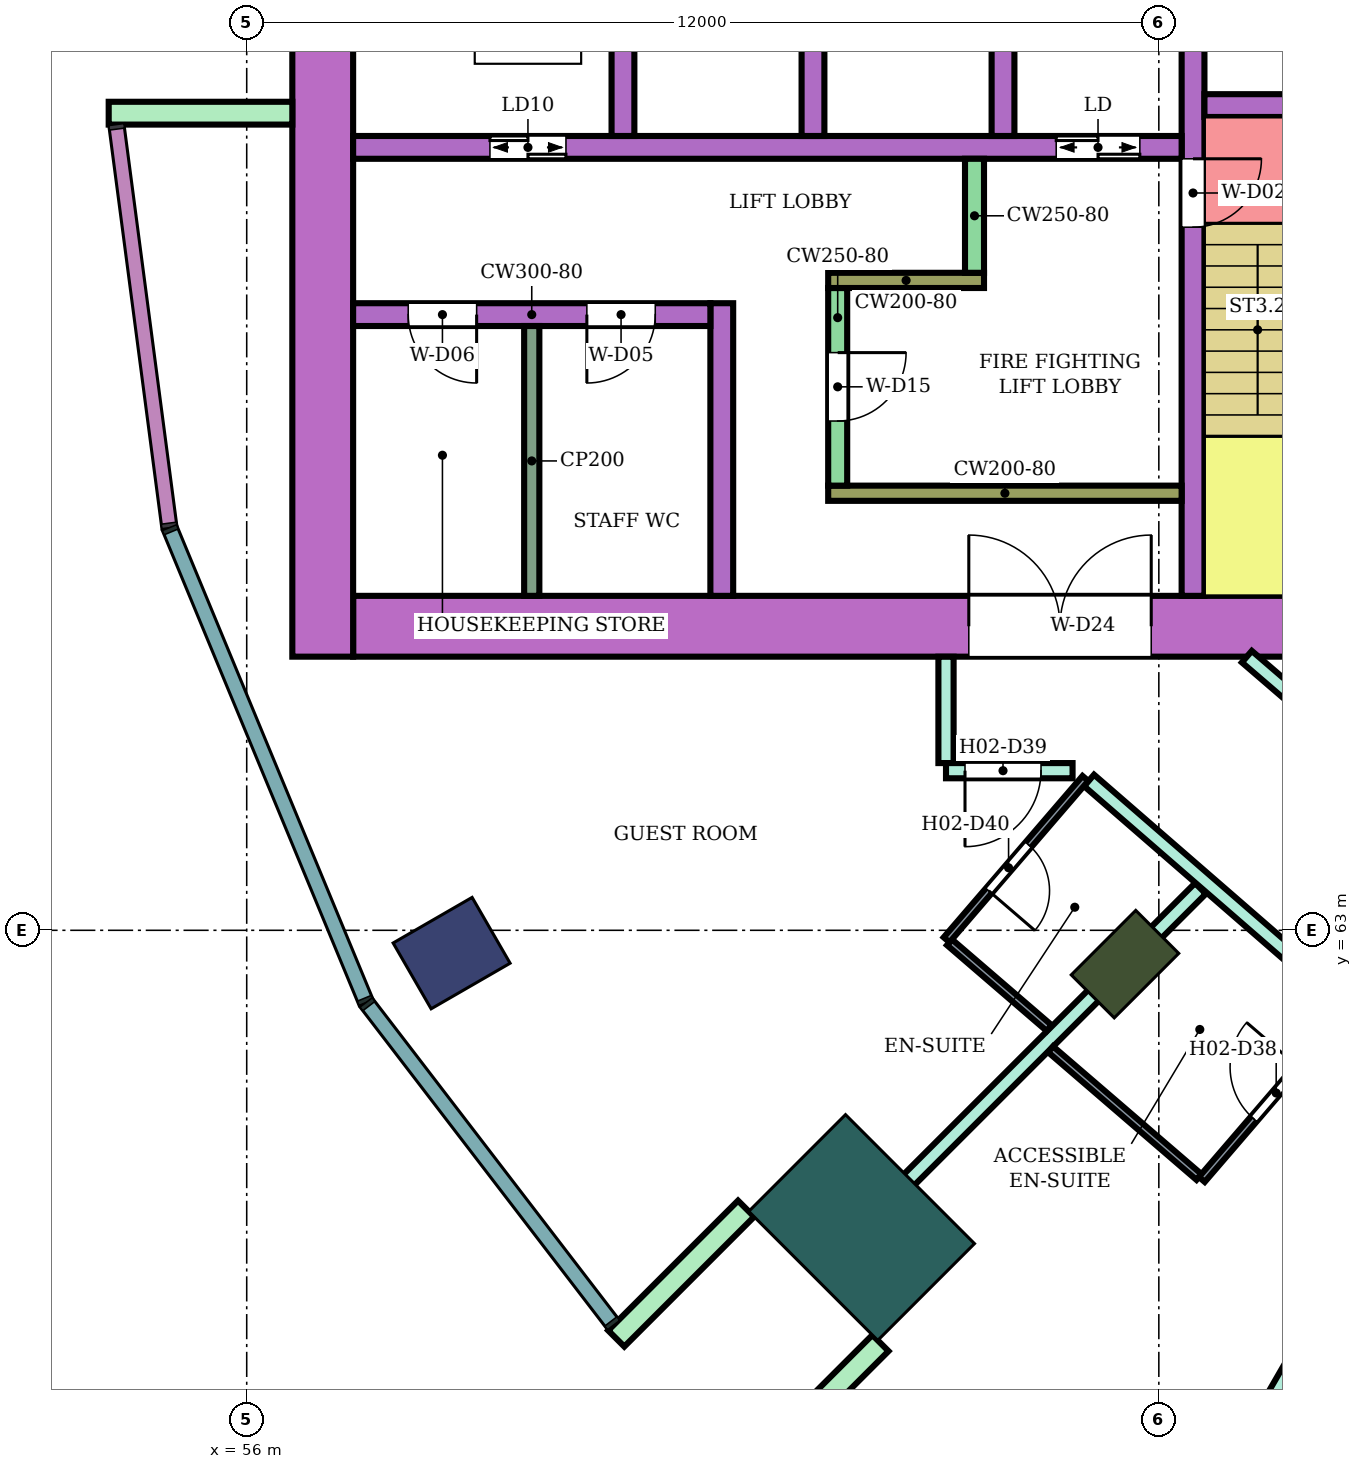
"""IFC4 building model, lengths in metres.
Left out: names, types, materials, properties, quantities, classifications, styles, units other than length and angle.
Written with IfcOpenShell. Run it as: python <this file> out.ifc"""

import sys

from ifc_helpers import new_model, si_unit, direction, frame, frame_2d, origin, origin_2d, place, context, subcontext, project, spatial, rectangle, extrude, element, fill, save


model = new_model("IFC4")
c1 = context("Model", 3, precision=1e-05, world=origin(), true_north=direction((0.0, 1.0)))
c2 = subcontext(c1, "Body", "Model", "MODEL_VIEW")
j1 = project(units=[si_unit("LENGTHUNIT", "METRE"), si_unit("PLANEANGLEUNIT", "RADIAN")], contexts=[c1])
p1 = place(None, origin())
s1 = spatial("IfcSite", under=j1, at=p1, CompositionType="ELEMENT")
p2 = place(p1, origin())
s2 = spatial("IfcBuilding", under=s1, at=p2, CompositionType="ELEMENT")
p3 = place(p2, frame((0.0, 0.0, 40.2)))
s3 = spatial("IfcBuildingStorey", under=s2, at=p3, CompositionType="ELEMENT", Elevation=40.2)
p4 = place(p3, frame((58.696, 62.7, 0.0), z_axis=(0.0, 0.0, 1.0), x_axis=(-0.866025403784, -0.5, 0.0)))
e1 = element("IfcColumn", 1, at=p4, inside=s3, PredefinedType="COLUMN", context=c2, shape_type="SweptSolid", body=[
    extrude(rectangle(XDim=1.2, YDim=1.0, at=origin_2d()), origin(), (0.0, 0.0, 1.0), 3.8),
])
p5 = place(p3, frame((67.555, 62.555, 0.0), z_axis=(0.0, 0.0, 1.0), x_axis=(-0.707106781187, -0.707106781187, 0.0)))
e2 = element("IfcColumn", 2, at=p5, inside=s3, PredefinedType="COLUMN", context=c2, shape_type="SweptSolid", body=[
    extrude(rectangle(XDim=1.2, YDim=0.8, at=origin_2d()), origin(), (0.0, 0.0, 1.0), 3.8),
])
p6 = place(p3, frame((64.09, 59.09, 0.0), z_axis=(0.0, 0.0, 1.0), x_axis=(-0.707106781187, -0.707106781187, 0.0)))
e3 = element("IfcColumn", 3, at=p6, inside=s3, PredefinedType="COLUMN", context=c2, shape_type="SweptSolid", body=[
    extrude(rectangle(XDim=1.8, YDim=2.4, at=origin_2d()), origin(), (0.0, 0.0, 1.0), 3.8),
])
p7 = place(p3, frame((72.1, 67.0, 0.0), z_axis=(0.0, 0.0, 1.0), x_axis=(-1.0, 0.0, 0.0)))
e4 = element("IfcWall", 4, at=p7, inside=s3, PredefinedType="SHEAR", context=c2, shape_type="SweptSolid", body=[
    extrude(rectangle(XDim=14.7, YDim=0.8, at=frame_2d((7.35, 0.0))), origin(), (0.0, 0.0, 1.0), 3.48),
])
p8 = place(p7, frame((4.2, 0.0, 0.0)))
e5 = element("IfcOpeningElement", 5, at=p8, cuts=e4, PredefinedType="OPENING", context=c2, shape_type="SweptSolid", body=[
    extrude(rectangle(XDim=2.4, YDim=2.4, at=frame_2d((1.2, 1.2))), frame((0.0, 0.41, 0.0), z_axis=(0.0, -1.0, 0.0), x_axis=(1.0, 0.0, 0.0)), (0.0, 0.0, 1.0), 0.82),
])
p9 = place(p3, frame((57.0, 83.4, 0.0), z_axis=(0.0, 0.0, 1.0), x_axis=(0.0, -1.0, 0.0)))
e6 = element("IfcWall", 6, at=p9, inside=s3, PredefinedType="SHEAR", context=c2, shape_type="SweptSolid", body=[
    extrude(rectangle(XDim=16.8, YDim=0.8, at=frame_2d((8.4, 0.0))), origin(), (0.0, 0.0, 1.0), 3.48),
])
p10 = place(p3, frame((68.45, 75.0, 0.0), z_axis=(0.0, 0.0, 1.0), x_axis=(0.0, -1.0, 0.0)))
e7 = element("IfcWall", 7, at=p10, inside=s3, PredefinedType="SHEAR", context=c2, shape_type="SweptSolid", body=[
    extrude(rectangle(XDim=7.6, YDim=0.3, at=frame_2d((3.8, 0.0))), origin(), (0.0, 0.0, 1.0), 3.48),
])
p11 = place(p10, frame((1.85, 0.0, 0.0)))
e8 = element("IfcOpeningElement", 8, at=p11, cuts=e7, PredefinedType="OPENING", context=c2, shape_type="SweptSolid", body=[
    extrude(rectangle(XDim=0.9, YDim=2.1, at=frame_2d((0.45, 1.05))), frame((0.0, 0.16, 0.0), z_axis=(0.0, -1.0, 0.0), x_axis=(1.0, 0.0, 0.0)), (0.0, 0.0, 1.0), 0.32),
])
p12 = place(p3, frame((71.65, 73.85, 0.0), z_axis=(0.0, 0.0, 1.0), x_axis=(-1.0, 0.0, 0.0)))
e9 = element("IfcWall", 9, at=p12, inside=s3, PredefinedType="SHEAR", context=c2, shape_type="SweptSolid", body=[
    extrude(rectangle(XDim=3.05, YDim=0.3, at=frame_2d((1.525, 0.0))), origin(), (0.0, 0.0, 1.0), 3.48),
])
p13 = place(p12, frame((1.1, 0.0, 0.0)))
e10 = element("IfcOpeningElement", 10, at=p13, cuts=e9, PredefinedType="OPENING", context=c2, shape_type="SweptSolid", body=[
    extrude(rectangle(XDim=0.7, YDim=2.0, at=frame_2d((0.35, 1.0))), frame((0.0, 0.16, 0.0), z_axis=(0.0, -1.0, 0.0), x_axis=(1.0, 0.0, 0.0)), (0.0, 0.0, 1.0), 0.32),
])
p14 = place(p3, frame((68.3, 73.3, 0.0), z_axis=(0.0, 0.0, 1.0), x_axis=(-1.0, 0.0, 0.0)))
e11 = element("IfcWall", 11, at=p14, inside=s3, PredefinedType="SHEAR", context=c2, shape_type="SweptSolid", body=[
    extrude(rectangle(XDim=10.9, YDim=0.3, at=frame_2d((5.45, 0.0))), origin(), (0.0, 0.0, 1.0), 3.48),
])
p15 = place(p14, frame((0.55, 0.0, 0.0)))
e12 = element("IfcOpeningElement", 12, at=p15, cuts=e11, PredefinedType="OPENING", context=c2, shape_type="SweptSolid", body=[
    extrude(rectangle(XDim=1.1, YDim=2.1, at=frame_2d((0.55, 1.05))), frame((0.0, 0.16, 0.0), z_axis=(0.0, -1.0, 0.0), x_axis=(1.0, 0.0, 0.0)), (0.0, 0.0, 1.0), 0.32),
])
p16 = place(p14, frame((8.1, 0.0, 0.0)))
e13 = element("IfcOpeningElement", 13, at=p16, cuts=e11, PredefinedType="OPENING", context=c2, shape_type="SweptSolid", body=[
    extrude(rectangle(XDim=1.0, YDim=2.1, at=frame_2d((0.5, 1.05))), frame((0.0, 0.16, 0.0), z_axis=(0.0, -1.0, 0.0), x_axis=(1.0, 0.0, 0.0)), (0.0, 0.0, 1.0), 0.32),
])
for number, where, z_axis, x_axis in (
    (14, (65.95, 76.0, 0.0), (0.0, 0.0, 1.0), (0.0, -1.0, 0.0)),
    (15, (63.45, 76.0, 0.0), (0.0, 0.0, 1.0), (0.0, -1.0, 0.0)),
    (16, (60.95, 76.0, 0.0), (0.0, 0.0, 1.0), (0.0, -1.0, 0.0)),
):
    element("IfcWall", number, at=place(p3, frame(where, z_axis=z_axis, x_axis=x_axis)), inside=s3, PredefinedType="SHEAR", context=c2, shape_type="SweptSolid", body=[
        extrude(rectangle(XDim=2.55, YDim=0.3, at=frame_2d((1.275, 0.0))), origin(), (0.0, 0.0, 1.0), 3.48),
    ])
p17 = place(p3, frame((68.3, 68.75, 0.0), z_axis=(0.0, 0.0, 1.0), x_axis=(-1.0, 0.0, 0.0)))
e17 = element("IfcWall", 17, at=p17, inside=s3, PredefinedType="SHEAR", context=c2, shape_type="SweptSolid", body=[
    extrude(rectangle(XDim=4.65, YDim=0.2, at=frame_2d((2.325, 0.0))), origin(), (0.0, 0.0, 1.0), 3.48),
])
p18 = place(p3, frame((63.775, 71.45, 0.0), z_axis=(0.0, 0.0, 1.0), x_axis=(0.0, -1.0, 0.0)))
e18 = element("IfcWall", 18, at=p18, inside=s3, PredefinedType="SHEAR", context=c2, shape_type="SweptSolid", body=[
    extrude(rectangle(XDim=2.6, YDim=0.25, at=frame_2d((1.3, 0.0))), origin(), (0.0, 0.0, 1.0), 3.48),
])
p19 = place(p18, frame((0.85, 0.0, 0.0)))
e19 = element("IfcOpeningElement", 19, at=p19, cuts=e18, PredefinedType="OPENING", context=c2, shape_type="SweptSolid", body=[
    extrude(rectangle(XDim=0.9, YDim=2.1, at=frame_2d((0.45, 1.05))), frame((0.0, 0.135, 0.0), z_axis=(0.0, -1.0, 0.0), x_axis=(1.0, 0.0, 0.0)), (0.0, 0.0, 1.0), 0.27),
])
p20 = place(p3, frame((65.7, 71.55, 0.0), z_axis=(0.0, 0.0, 1.0), x_axis=(-1.0, 0.0, 0.0)))
e20 = element("IfcWall", 20, at=p20, inside=s3, PredefinedType="SHEAR", context=c2, shape_type="SweptSolid", body=[
    extrude(rectangle(XDim=2.05, YDim=0.2, at=frame_2d((1.025, 0.0))), origin(), (0.0, 0.0, 1.0), 3.48),
])
p21 = place(p3, frame((65.575, 73.15, 0.0), z_axis=(0.0, 0.0, 1.0), x_axis=(0.0, -1.0, 0.0)))
e21 = element("IfcWall", 21, at=p21, inside=s3, PredefinedType="SHEAR", context=c2, shape_type="SweptSolid", body=[
    extrude(rectangle(XDim=1.5, YDim=0.25, at=frame_2d((0.75, 0.0))), origin(), (0.0, 0.0, 1.0), 3.48),
])
p22 = place(p3, frame((62.25, 71.25, 0.0), z_axis=(0.0, 0.0, 1.0), x_axis=(0.0, -1.0, 0.0)))
e22 = element("IfcWall", 22, at=p22, inside=s3, PredefinedType="SHEAR", context=c2, shape_type="SweptSolid", body=[
    extrude(rectangle(XDim=3.85, YDim=0.3, at=frame_2d((1.925, 0.0))), origin(), (0.0, 0.0, 1.0), 3.48),
])
p23 = place(p3, frame((62.1, 71.1, 0.0), z_axis=(0.0, 0.0, 1.0), x_axis=(-1.0, 0.0, 0.0)))
e23 = element("IfcWall", 23, at=p23, inside=s3, PredefinedType="SHEAR", context=c2, shape_type="SweptSolid", body=[
    extrude(rectangle(XDim=4.7, YDim=0.3, at=frame_2d((2.35, 0.0))), origin(), (0.0, 0.0, 1.0), 3.48),
])
p24 = place(p23, frame((0.725, 0.0, 0.0)))
e24 = element("IfcOpeningElement", 24, at=p24, cuts=e23, PredefinedType="OPENING", context=c2, shape_type="SweptSolid", body=[
    extrude(rectangle(XDim=0.9, YDim=2.1, at=frame_2d((0.45, 1.05))), frame((0.0, 0.16, 0.0), z_axis=(0.0, -1.0, 0.0), x_axis=(1.0, 0.0, 0.0)), (0.0, 0.0, 1.0), 0.32),
])
p25 = place(p23, frame((3.075, 0.0, 0.0)))
e25 = element("IfcOpeningElement", 25, at=p25, cuts=e23, PredefinedType="OPENING", context=c2, shape_type="SweptSolid", body=[
    extrude(rectangle(XDim=0.9, YDim=2.1, at=frame_2d((0.45, 1.05))), frame((0.0, 0.16, 0.0), z_axis=(0.0, -1.0, 0.0), x_axis=(1.0, 0.0, 0.0)), (0.0, 0.0, 1.0), 0.32),
])
for number, where, z_axis, x_axis in (
    (26, (56.6, 73.75, 0.0), (0.0, 0.0, 1.0), (-1.0, 0.0, 0.0)),
    (27, (62.57, 59.338, 0.0), (0.0, 0.0, 1.0), (-0.707, -0.707, 0.0)),
    (28, (64.338, 57.57, 0.0), (0.0, 0.0, 1.0), (-0.707, -0.707, 0.0)),
):
    element("IfcWall", number, at=place(p3, frame(where, z_axis=z_axis, x_axis=x_axis)), inside=s3, PredefinedType="NOTDEFINED", context=c2, shape_type="SweptSolid", body=[
        extrude(rectangle(XDim=2.416, YDim=0.3, at=frame_2d((1.208, 0.0))), origin(), (0.0, 0.0, 1.0), 3.8),
    ])
p26 = place(p3, frame((63.594, 58.598, 0.0), z_axis=(0.0, 0.0, 1.0), x_axis=(0.707228748718, 0.706984792613, 0.0)))
e29 = element("IfcWall", 29, at=p26, inside=s3, PredefinedType="PARTITIONING", context=c2, shape_type="SweptSolid", body=[
    extrude(rectangle(XDim=7.005, YDim=0.2, at=frame_2d((3.503, 0.0))), origin(), (0.0, 0.0, 1.0), 3.35),
])
p27 = place(p3, frame((65.2, 65.2, 0.0), z_axis=(0.0, 0.0, 1.0), x_axis=(0.0, 1.0, 0.0)))
e30 = element("IfcWall", 30, at=p27, inside=s3, PredefinedType="PARTITIONING", context=c2, shape_type="SweptSolid", body=[
    extrude(rectangle(XDim=1.399, YDim=0.2, at=frame_2d((0.7, 0.0))), origin(), (0.0, 0.0, 1.0), 3.35),
])
p28 = place(p3, frame((65.2, 65.1, 0.0), z_axis=(0.0, 0.0, 1.0), x_axis=(1.0, 0.0, 0.0)))
e31 = element("IfcWall", 31, at=p28, inside=s3, PredefinedType="PARTITIONING", context=c2, shape_type="SweptSolid", body=[
    extrude(rectangle(XDim=1.665, YDim=0.2, at=frame_2d((0.833, 0.0))), origin(), (0.0, 0.0, 1.0), 3.35),
])
p29 = place(p28, frame((0.25, 0.0, 0.0)))
e32 = element("IfcOpeningElement", 32, at=p29, cuts=e31, PredefinedType="OPENING", context=c2, shape_type="SweptSolid", body=[
    extrude(rectangle(XDim=1.0, YDim=2.1, at=frame_2d((0.5, 1.05))), frame((0.0, 0.11, 0.0), z_axis=(0.0, -1.0, 0.0), x_axis=(1.0, 0.0, 0.0)), (0.0, 0.0, 1.0), 0.22),
])
p30 = place(p3, frame((67.082, 64.972, 0.0), z_axis=(0.0, 0.0, 1.0), x_axis=(0.755033632617, -0.655686063309, 0.0)))
e33 = element("IfcWall", 33, at=p30, inside=s3, PredefinedType="PARTITIONING", context=c2, shape_type="SweptSolid", body=[
    extrude(rectangle(XDim=6.185, YDim=0.2, at=frame_2d((3.093, 0.0))), origin(), (0.0, 0.0, 1.0), 3.35),
])
p31 = place(p30, frame((4.778, 0.0, 0.0)))
e34 = element("IfcOpeningElement", 34, at=p31, cuts=e33, PredefinedType="OPENING", context=c2, shape_type="SweptSolid", body=[
    extrude(rectangle(XDim=1.1, YDim=2.1, at=frame_2d((0.55, 1.05))), frame((0.0, 0.11, 0.0), z_axis=(0.0, -1.0, 0.0), x_axis=(1.0, 0.0, 0.0)), (0.0, 0.0, 1.0), 0.22),
])
p32 = place(p3, frame((67.094, 52.663, 0.0), z_axis=(0.0, 0.0, 1.0), x_axis=(0.500216854217, 0.865900166738, 0.0)))
e35 = element("IfcWall", 35, at=p32, inside=s3, PredefinedType="PARTITIONING", context=c2, shape_type="SweptSolid", body=[
    extrude(rectangle(XDim=9.375, YDim=0.2, at=frame_2d((4.688, 0.0))), origin(), (0.0, 0.0, 1.0), 3.35),
])
p33 = place(p3, frame((69.158, 66.6, 0.0), z_axis=(0.0, 0.0, 1.0), x_axis=(0.758063092745, -0.652181222835, 0.0)))
e36 = element("IfcWall", 36, at=p33, inside=s3, PredefinedType="PARTITIONING", context=c2, shape_type="SweptSolid", body=[
    extrude(rectangle(XDim=5.16, YDim=0.2, at=frame_2d((2.58, 0.0))), origin(), (0.0, 0.0, 1.0), 3.35),
])
p34 = place(p33, frame((2.165, 0.0, 0.0)))
e37 = element("IfcOpeningElement", 37, at=p34, cuts=e36, PredefinedType="OPENING", context=c2, shape_type="SweptSolid", body=[
    extrude(rectangle(XDim=0.9, YDim=2.1, at=frame_2d((0.45, 1.05))), frame((0.0, 0.11, 0.0), z_axis=(0.0, -1.0, 0.0), x_axis=(1.0, 0.0, 0.0)), (0.0, 0.0, 1.0), 0.22),
])
p35 = place(p3, frame((65.246, 62.842, 0.0), z_axis=(0.0, 0.0, 1.0), x_axis=(0.758030338995, -0.652219292234, 0.0)))
e38 = element("IfcWall", 38, at=p35, inside=s3, PredefinedType="PARTITIONING", context=c2, shape_type="SweptSolid", body=[
    extrude(rectangle(XDim=1.73, YDim=0.1, at=frame_2d((0.865, 0.0))), origin(), (0.0, 0.0, 1.0), 3.35),
])
p36 = place(p3, frame((65.208, 62.875, 0.0), z_axis=(0.0, 0.0, 1.0), x_axis=(0.65205430601, 0.758172264076, 0.0)))
e39 = element("IfcWall", 39, at=p36, inside=s3, PredefinedType="PARTITIONING", context=c2, shape_type="SweptSolid", body=[
    extrude(rectangle(XDim=2.8, YDim=0.1, at=frame_2d((1.4, 0.0))), origin(), (0.0, 0.0, 1.0), 3.35),
])
p37 = place(p36, frame((0.85, 0.0, 0.0)))
e40 = element("IfcOpeningElement", 40, at=p37, cuts=e39, PredefinedType="OPENING", context=c2, shape_type="SweptSolid", body=[
    extrude(rectangle(XDim=0.8, YDim=2.1, at=frame_2d((0.4, 1.05))), frame((0.0, 0.06, 0.0), z_axis=(0.0, -1.0, 0.0), x_axis=(1.0, 0.0, 0.0)), (0.0, 0.0, 1.0), 0.12),
])
p38 = place(p3, frame((66.576, 61.435, 0.0), z_axis=(0.0, 0.0, 1.0), x_axis=(0.757970550281, -0.652288774169, 0.0)))
e41 = element("IfcWall", 41, at=p38, inside=s3, PredefinedType="PARTITIONING", context=c2, shape_type="SweptSolid", body=[
    extrude(rectangle(XDim=2.576, YDim=0.1, at=frame_2d((1.288, 0.0))), origin(), (0.0, 0.0, 1.0), 3.35),
])
p39 = place(p3, frame((68.566, 59.722, 0.0), z_axis=(0.0, 0.0, 1.0), x_axis=(0.65193146671, 0.758277892803, 0.0)))
e42 = element("IfcWall", 42, at=p39, inside=s3, PredefinedType="PARTITIONING", context=c2, shape_type="SweptSolid", body=[
    extrude(rectangle(XDim=2.89, YDim=0.1, at=frame_2d((1.445, 0.0))), origin(), (0.0, 0.0, 1.0), 3.35),
])
p40 = place(p39, frame((1.05, 0.0, 0.0)))
e43 = element("IfcOpeningElement", 43, at=p40, cuts=e42, PredefinedType="OPENING", context=c2, shape_type="SweptSolid", body=[
    extrude(rectangle(XDim=0.9, YDim=2.1, at=frame_2d((0.45, 1.05))), frame((0.0, 0.06, 0.0), z_axis=(0.0, -1.0, 0.0), x_axis=(1.0, 0.0, 0.0)), (0.0, 0.0, 1.0), 0.12),
])
p41 = place(p3, frame((59.75, 70.95, 0.0), z_axis=(0.0, 0.0, 1.0), x_axis=(0.0, -1.0, 0.0)))
e44 = element("IfcWall", 44, at=p41, inside=s3, PredefinedType="PARTITIONING", context=c2, shape_type="SweptSolid", body=[
    extrude(rectangle(XDim=3.55, YDim=0.2, at=frame_2d((1.775, 0.0))), origin(), (0.0, 0.0, 1.0), 3.48),
])
p42 = place(p40, origin())
e45 = element("IfcDoor", 45, at=p42, inside=s3, OperationType="SINGLE_SWING_RIGHT", PredefinedType="DOOR", context=c2, shape_type="SweptSolid", body=[
    extrude(rectangle(XDim=0.9, YDim=2.1, at=frame_2d((0.45, 1.05))), frame((0.0, 0.025, 0.0), z_axis=(0.0, -1.0, 0.0), x_axis=(1.0, 0.0, 0.0)), (0.0, 0.0, 1.0), 0.05),
])
fill(e43, e45)
p43 = place(p29, frame((1.0, 0.0, 0.0), z_axis=(0.0, 0.0, 1.0), x_axis=(-1.0, 0.0, 0.0)))
e46 = element("IfcDoor", 46, at=p43, inside=s3, OperationType="SINGLE_SWING_RIGHT", PredefinedType="DOOR", context=c2, shape_type="SweptSolid", body=[
    extrude(rectangle(XDim=1.0, YDim=2.1, at=frame_2d((0.5, 1.05))), frame((0.0, 0.025, 0.0), z_axis=(0.0, -1.0, 0.0), x_axis=(1.0, 0.0, 0.0)), (0.0, 0.0, 1.0), 0.05),
])
fill(e32, e46)
p44 = place(p37, frame((0.8, 0.0, 0.0), z_axis=(0.0, 0.0, 1.0), x_axis=(-1.0, 0.0, 0.0)))
e47 = element("IfcDoor", 47, at=p44, inside=s3, OperationType="SINGLE_SWING_RIGHT", PredefinedType="DOOR", context=c2, shape_type="SweptSolid", body=[
    extrude(rectangle(XDim=0.8, YDim=2.1, at=frame_2d((0.4, 1.05))), frame((0.0, 0.025, 0.0), z_axis=(0.0, -1.0, 0.0), x_axis=(1.0, 0.0, 0.0)), (0.0, 0.0, 1.0), 0.05),
])
fill(e40, e47)
p45 = place(p11, origin())
e48 = element("IfcDoor", 48, at=p45, inside=s3, OperationType="SINGLE_SWING_LEFT", PredefinedType="DOOR", context=c2, shape_type="SweptSolid", body=[
    extrude(rectangle(XDim=0.9, YDim=2.1, at=frame_2d((0.45, 1.05))), frame((0.0, 0.025, 0.0), z_axis=(0.0, -1.0, 0.0), x_axis=(1.0, 0.0, 0.0)), (0.0, 0.0, 1.0), 0.05),
])
fill(e8, e48)
p46 = place(p15, origin())
e49 = element("IfcDoor", 49, at=p46, inside=s3, OperationType="DOUBLE_DOOR_SLIDING", PredefinedType="DOOR", context=c2, shape_type="SweptSolid", body=[
    extrude(rectangle(XDim=1.1, YDim=2.1, at=frame_2d((0.55, 1.05))), frame((0.0, 0.025, 0.0), z_axis=(0.0, -1.0, 0.0), x_axis=(1.0, 0.0, 0.0)), (0.0, 0.0, 1.0), 0.05),
])
fill(e12, e49)
p47 = place(p16, origin())
e50 = element("IfcDoor", 50, at=p47, inside=s3, OperationType="DOUBLE_DOOR_SLIDING", PredefinedType="DOOR", context=c2, shape_type="SweptSolid", body=[
    extrude(rectangle(XDim=1.0, YDim=2.1, at=frame_2d((0.5, 1.05))), frame((0.0, 0.025, 0.0), z_axis=(0.0, -1.0, 0.0), x_axis=(1.0, 0.0, 0.0)), (0.0, 0.0, 1.0), 0.05),
])
fill(e13, e50)
p48 = place(p19, origin())
e51 = element("IfcDoor", 51, at=p48, inside=s3, OperationType="SINGLE_SWING_LEFT", PredefinedType="DOOR", context=c2, shape_type="SweptSolid", body=[
    extrude(rectangle(XDim=0.9, YDim=2.1, at=frame_2d((0.45, 1.05))), frame((0.0, 0.025, 0.0), z_axis=(0.0, -1.0, 0.0), x_axis=(1.0, 0.0, 0.0)), (0.0, 0.0, 1.0), 0.05),
])
fill(e19, e51)
p49 = place(p24, origin())
e52 = element("IfcDoor", 52, at=p49, inside=s3, OperationType="SINGLE_SWING_RIGHT", PredefinedType="DOOR", context=c2, shape_type="SweptSolid", body=[
    extrude(rectangle(XDim=0.9, YDim=2.1, at=frame_2d((0.45, 1.05))), frame((0.0, 0.025, 0.0), z_axis=(0.0, -1.0, 0.0), x_axis=(1.0, 0.0, 0.0)), (0.0, 0.0, 1.0), 0.05),
])
fill(e24, e52)
p50 = place(p25, origin())
e53 = element("IfcDoor", 53, at=p50, inside=s3, OperationType="SINGLE_SWING_LEFT", PredefinedType="DOOR", context=c2, shape_type="SweptSolid", body=[
    extrude(rectangle(XDim=0.9, YDim=2.1, at=frame_2d((0.45, 1.05))), frame((0.0, 0.025, 0.0), z_axis=(0.0, -1.0, 0.0), x_axis=(1.0, 0.0, 0.0)), (0.0, 0.0, 1.0), 0.05),
])
fill(e25, e53)
p51 = place(p8, frame((2.4, 0.0, 0.0), z_axis=(0.0, 0.0, 1.0), x_axis=(-1.0, 0.0, 0.0)))
e54 = element("IfcDoor", 54, at=p51, inside=s3, OperationType="DOUBLE_DOOR_SINGLE_SWING", PredefinedType="DOOR", context=c2, shape_type="SweptSolid", body=[
    extrude(rectangle(XDim=2.4, YDim=2.4, at=frame_2d((1.2, 1.2))), frame((0.0, 0.025, 0.0), z_axis=(0.0, -1.0, 0.0), x_axis=(1.0, 0.0, 0.0)), (0.0, 0.0, 1.0), 0.05),
])
fill(e5, e54)
save(model, sys.argv[1])
